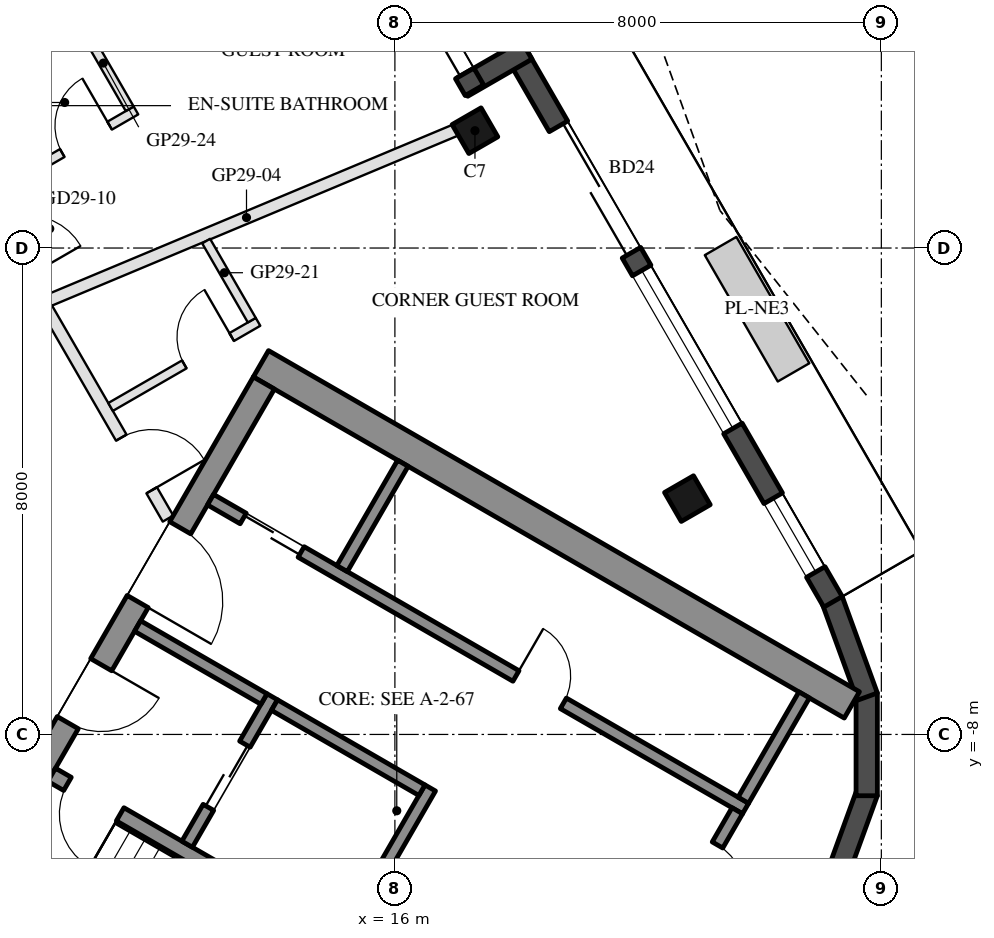
"""IFC4 building model, lengths in metres.
Left out: names, types, materials, properties, quantities, classifications, styles, units other than length and angle.
Written with IfcOpenShell. Run it as: python <this file> out.ifc"""

import sys

from ifc_helpers import new_model, si_unit, direction, frame, frame_2d, origin, origin_2d, place, context, subcontext, project, spatial, rectangle, hollow_rectangle, extrude, boolean, halfspace, element, fill, save


model = new_model("IFC4")
c1 = context("Model", 3, precision=1e-05, world=origin(), true_north=direction((0.0, 1.0)))
c2 = subcontext(c1, "Body", "Model", "MODEL_VIEW")
j1 = project(units=[si_unit("LENGTHUNIT", "METRE"), si_unit("PLANEANGLEUNIT", "RADIAN")], contexts=[c1])
p1 = place(None, origin())
s1 = spatial("IfcSite", under=j1, at=p1, CompositionType="ELEMENT")
p2 = place(p1, origin())
s2 = spatial("IfcBuilding", under=s1, at=p2, CompositionType="ELEMENT")
p3 = place(p2, frame((0.0, 0.0, 291.1)))
s3 = spatial("IfcBuildingStorey", under=s2, at=p3, CompositionType="ELEMENT", Elevation=291.1)
p4 = place(p3, frame((20.81, -4.121, 0.0), z_axis=(0.0, 0.0, 1.0), x_axis=(-0.5, 0.866025403784, 0.0)))
e1 = element("IfcColumn", 1, at=p4, inside=s3, PredefinedType="COLUMN", context=c2, shape_type="SweptSolid", body=[
    boolean("DIFFERENCE", extrude(hollow_rectangle(XDim=0.55, YDim=0.55, WallThickness=0.025, at=origin_2d()), origin(), (0.0, 0.0, 1.0), 3.7), halfspace(frame((0.0, 0.0, 0.04), z_axis=(0.0, 0.0, 1.0), x_axis=(1.0, 0.0, 0.0)), True)),
])
p5 = place(p3, frame((17.317, 1.93, 0.0), z_axis=(0.0, 0.0, 1.0), x_axis=(-0.5, 0.866025403784, 0.0)))
e2 = element("IfcColumn", 2, at=p5, inside=s3, PredefinedType="COLUMN", context=c2, shape_type="SweptSolid", body=[
    boolean("DIFFERENCE", extrude(hollow_rectangle(XDim=0.55, YDim=0.55, WallThickness=0.025, at=origin_2d()), origin(), (0.0, 0.0, 1.0), 3.7), halfspace(frame((0.0, 0.0, 0.034), z_axis=(0.0, 0.0, 1.0), x_axis=(1.0, 0.0, 0.0)), True)),
])
for number, where, z_axis, x_axis in (
    (3, (23.192, -10.536, 0.0), (0.0, 0.0, 1.0), (0.342, 0.94, 0.0)),
    (4, (23.759, -9.008, 0.0), (0.0, 0.0, 1.0), (0.0, 1.0, 0.0)),
    (5, (23.77, -7.379, 0.0), (0.0, 0.0, 1.0), (-0.342, 0.94, 0.0)),
):
    element("IfcWall", number, at=place(p3, frame(where, z_axis=z_axis, x_axis=x_axis)), inside=s3, PredefinedType="SOLIDWALL", context=c2, shape_type="SweptSolid", body=[
        extrude(rectangle(XDim=1.689, YDim=0.35, at=frame_2d((0.845, 0.0))), origin(), (0.0, 0.0, 1.0), 3.55),
    ])
p6 = place(p3, frame((23.205, -5.819, 0.0), z_axis=(0.0, 0.0, 1.0), x_axis=(-0.500010118922, 0.866019561543, 0.0)))
e6 = element("IfcWall", 6, at=p6, inside=s3, PredefinedType="SOLIDWALL", context=c2, shape_type="SweptSolid", body=[
    extrude(rectangle(XDim=10.554, YDim=0.35, at=frame_2d((5.277, 0.0))), origin(), (0.0, 0.0, 1.0), 3.55),
])
p7 = place(p6, frame((0.566, 0.0, 0.3)))
e7 = element("IfcOpeningElement", 7, at=p7, cuts=e6, PredefinedType="OPENING", context=c2, shape_type="SweptSolid", body=[
    extrude(rectangle(XDim=1.4, YDim=2.65, at=frame_2d((0.7, 1.325))), frame((0.0, 0.185, 0.0), z_axis=(0.0, -1.0, 0.0), x_axis=(1.0, 0.0, 0.0)), (0.0, 0.0, 1.0), 0.37),
])
p8 = place(p6, frame((6.63, 0.0, 0.0)))
e8 = element("IfcOpeningElement", 8, at=p8, cuts=e6, PredefinedType="OPENING", context=c2, shape_type="SweptSolid", body=[
    extrude(rectangle(XDim=2.4, YDim=2.4, at=frame_2d((1.2, 1.2))), frame((0.0, 0.185, 0.0), z_axis=(0.0, -1.0, 0.0), x_axis=(1.0, 0.0, 0.0)), (0.0, 0.0, 1.0), 0.37),
])
p9 = place(p6, frame((3.292, 0.0, 0.3)))
e9 = element("IfcOpeningElement", 9, at=p9, cuts=e6, PredefinedType="OPENING", context=c2, shape_type="SweptSolid", body=[
    extrude(rectangle(XDim=3.0, YDim=2.65, at=frame_2d((1.5, 1.325))), frame((0.0, 0.185, 0.0), z_axis=(0.0, -1.0, 0.0), x_axis=(1.0, 0.0, 0.0)), (0.0, 0.0, 1.0), 0.37),
])
p10 = place(p3, frame((18.167, 3.258, 0.0), z_axis=(0.0, 0.0, 1.0), x_axis=(-0.866005645448, -0.500034220881, 0.0)))
e10 = element("IfcWall", 10, at=p10, inside=s3, PredefinedType="SOLIDWALL", context=c2, shape_type="SweptSolid", body=[
    extrude(rectangle(XDim=1.22, YDim=0.35, at=frame_2d((0.61, 0.0))), origin(), (0.0, 0.0, 1.0), 3.55),
])
p11 = place(p3, frame((17.308, 2.595, 0.0), z_axis=(0.0, 0.0, 1.0), x_axis=(-0.500005339912, 0.866022320763, 0.0)))
e11 = element("IfcWall", 11, at=p11, inside=s3, PredefinedType="SOLIDWALL", context=c2, shape_type="SweptSolid", body=[
    extrude(rectangle(XDim=5.827, YDim=0.35, at=frame_2d((2.914, 0.0))), origin(), (0.0, 0.0, 1.0), 3.55),
])
p12 = place(p11, frame((0.32, 0.0, 0.0)))
e12 = element("IfcOpeningElement", 12, at=p12, cuts=e11, PredefinedType="OPENING", context=c2, shape_type="SweptSolid", body=[
    extrude(rectangle(XDim=1.8, YDim=2.4, at=frame_2d((0.9, 1.2))), frame((0.0, 0.185, 0.0), z_axis=(0.0, -1.0, 0.0), x_axis=(1.0, 0.0, 0.0)), (0.0, 0.0, 1.0), 0.37),
])
p13 = place(p11, frame((2.42, 0.0, 0.3)))
e13 = element("IfcOpeningElement", 13, at=p13, cuts=e11, PredefinedType="OPENING", context=c2, shape_type="SweptSolid", body=[
    extrude(rectangle(XDim=1.5, YDim=2.65, at=frame_2d((0.75, 1.325))), frame((0.0, 0.185, 0.0), z_axis=(0.0, -1.0, 0.0), x_axis=(1.0, 0.0, 0.0)), (0.0, 0.0, 1.0), 0.37),
])
p14 = place(p3, frame((13.797, -1.903, 0.0), z_axis=(0.0, 0.0, 1.0), x_axis=(0.866025449148, -0.499999921427, 0.0)))
e14 = element("IfcWall", 14, at=p14, inside=s3, PredefinedType="SHEAR", context=c2, shape_type="SweptSolid", body=[
    extrude(rectangle(XDim=11.222, YDim=0.5, at=frame_2d((5.611, 0.0))), origin(), (0.0, 0.0, 1.0), 3.5),
])
p15 = place(p3, frame((8.845, -10.88, 0.0), z_axis=(0.0, 0.0, 1.0), x_axis=(0.500004234368, 0.866022959057, 0.0)))
e15 = element("IfcWall", 15, at=p15, inside=s3, PredefinedType="SHEAR", context=c2, shape_type="SweptSolid", body=[
    extrude(rectangle(XDim=10.0, YDim=0.4, at=frame_2d((5.0, 0.0))), origin(), (0.0, 0.0, 1.0), 3.5),
])
p16 = place(p15, frame((3.55, 0.0, 0.0)))
e16 = element("IfcOpeningElement", 16, at=p16, cuts=e15, PredefinedType="OPENING", context=c2, shape_type="SweptSolid", body=[
    extrude(rectangle(XDim=1.1, YDim=2.1, at=frame_2d((0.55, 1.05))), frame((0.0, 0.21, 0.0), z_axis=(0.0, -1.0, 0.0), x_axis=(1.0, 0.0, 0.0)), (0.0, 0.0, 1.0), 0.42),
])
p17 = place(p15, frame((5.85, 0.0, 0.0)))
e17 = element("IfcOpeningElement", 17, at=p17, cuts=e15, PredefinedType="OPENING", context=c2, shape_type="SweptSolid", body=[
    extrude(rectangle(XDim=1.4, YDim=2.1, at=frame_2d((0.7, 1.05))), frame((0.0, 0.21, 0.0), z_axis=(0.0, -1.0, 0.0), x_axis=(1.0, 0.0, 0.0)), (0.0, 0.0, 1.0), 0.42),
])
p18 = place(p3, frame((10.356, -8.664, 0.0), z_axis=(0.0, 0.0, 1.0), x_axis=(0.866028629588, -0.499994412703, 0.0)))
e18 = element("IfcWall", 18, at=p18, inside=s3, PredefinedType="SHEAR", context=c2, shape_type="SweptSolid", body=[
    extrude(rectangle(XDim=6.45, YDim=0.25, at=frame_2d((3.225, 0.0))), origin(), (0.0, 0.0, 1.0), 3.5),
])
p19 = place(p18, frame((0.3, 0.0, 0.0)))
e19 = element("IfcOpeningElement", 19, at=p19, cuts=e18, PredefinedType="OPENING", context=c2, shape_type="SweptSolid", body=[
    extrude(rectangle(XDim=1.0, YDim=2.1, at=frame_2d((0.5, 1.05))), frame((0.0, 0.135, 0.0), z_axis=(0.0, -1.0, 0.0), x_axis=(1.0, 0.0, 0.0)), (0.0, 0.0, 1.0), 0.27),
])
p20 = place(p3, frame((15.181, -11.305, 0.0), z_axis=(0.0, 0.0, 1.0), x_axis=(0.49994636267, 0.866056369097, 0.0)))
e20 = element("IfcWall", 20, at=p20, inside=s3, PredefinedType="SHEAR", context=c2, shape_type="SweptSolid", body=[
    extrude(rectangle(XDim=2.8, YDim=0.2, at=frame_2d((1.4, 0.0))), origin(), (0.0, 0.0, 1.0), 3.5),
])
p21 = place(p3, frame((12.583, -9.805, 0.0), z_axis=(0.0, 0.0, 1.0), x_axis=(0.49994636267, 0.866056369097, 0.0)))
e21 = element("IfcWall", 21, at=p21, inside=s3, PredefinedType="SHEAR", context=c2, shape_type="SweptSolid", body=[
    extrude(rectangle(XDim=2.8, YDim=0.2, at=frame_2d((1.4, 0.0))), origin(), (0.0, 0.0, 1.0), 3.5),
])
p22 = place(p21, frame((0.7, 0.0, 0.0)))
e22 = element("IfcOpeningElement", 22, at=p22, cuts=e21, PredefinedType="OPENING", context=c2, shape_type="SweptSolid", body=[
    extrude(rectangle(XDim=1.2, YDim=2.1, at=frame_2d((0.6, 1.05))), frame((0.0, 0.11, 0.0), z_axis=(0.0, -1.0, 0.0), x_axis=(1.0, 0.0, 0.0)), (0.0, 0.0, 1.0), 0.22),
])
p23 = place(p3, frame((11.768, -6.217, 0.0), z_axis=(0.0, 0.0, 1.0), x_axis=(0.866050077142, -0.499957262057, 0.0)))
e23 = element("IfcWall", 23, at=p23, inside=s3, PredefinedType="SHEAR", context=c2, shape_type="SweptSolid", body=[
    extrude(rectangle(XDim=2.4, YDim=0.2, at=frame_2d((1.2, 0.0))), origin(), (0.0, 0.0, 1.0), 3.5),
])
p24 = place(p3, frame((14.02, -7.517, 0.0), z_axis=(0.0, 0.0, 1.0), x_axis=(0.866034573852, -0.49998411664, 0.0)))
e24 = element("IfcWall", 24, at=p24, inside=s3, PredefinedType="SHEAR", context=c2, shape_type="SweptSolid", body=[
    extrude(rectangle(XDim=2.8, YDim=0.2, at=frame_2d((1.4, 0.0))), origin(), (0.0, 0.0, 1.0), 3.5),
])
p25 = place(p3, frame((12.968, -4.138, 0.0), z_axis=(0.0, 0.0, 1.0), x_axis=(0.866028328073, -0.49999493495, 0.0)))
e25 = element("IfcWall", 25, at=p25, inside=s3, PredefinedType="SHEAR", context=c2, shape_type="SweptSolid", body=[
    extrude(rectangle(XDim=10.16, YDim=0.2, at=frame_2d((5.08, 0.0))), origin(), (0.0, 0.0, 1.0), 3.5),
])
p26 = place(p25, frame((0.62, 0.0, 0.0)))
e26 = element("IfcOpeningElement", 26, at=p26, cuts=e25, PredefinedType="OPENING", context=c2, shape_type="SweptSolid", body=[
    extrude(rectangle(XDim=1.1, YDim=2.1, at=frame_2d((0.55, 1.05))), frame((0.0, 0.11, 0.0), z_axis=(0.0, -1.0, 0.0), x_axis=(1.0, 0.0, 0.0)), (0.0, 0.0, 1.0), 0.22),
])
p27 = place(p25, frame((5.8, 0.0, 0.0)))
e27 = element("IfcOpeningElement", 27, at=p27, cuts=e25, PredefinedType="OPENING", context=c2, shape_type="SweptSolid", body=[
    extrude(rectangle(XDim=0.9, YDim=2.1, at=frame_2d((0.45, 1.05))), frame((0.0, 0.11, 0.0), z_axis=(0.0, -1.0, 0.0), x_axis=(1.0, 0.0, 0.0)), (0.0, 0.0, 1.0), 0.22),
])
p28 = place(p3, frame((20.73, -10.814, 0.0), z_axis=(0.0, 0.0, 1.0), x_axis=(0.499961193289, 0.866047807691, 0.0)))
e28 = element("IfcWall", 28, at=p28, inside=s3, PredefinedType="SHEAR", context=c2, shape_type="SweptSolid", body=[
    extrude(rectangle(XDim=1.8, YDim=0.2, at=frame_2d((0.9, 0.0))), origin(), (0.0, 0.0, 1.0), 3.5),
])
p29 = place(p28, frame((0.25, 0.0, 0.0)))
e29 = element("IfcOpeningElement", 29, at=p29, cuts=e28, PredefinedType="OPENING", context=c2, shape_type="SweptSolid", body=[
    extrude(rectangle(XDim=0.9, YDim=2.1, at=frame_2d((0.45, 1.05))), frame((0.0, 0.11, 0.0), z_axis=(0.0, -1.0, 0.0), x_axis=(1.0, 0.0, 0.0)), (0.0, 0.0, 1.0), 0.22),
])
for number, where, z_axis, x_axis in (
    (30, (15.131, -5.272, 0.0), (0.0, 0.0, 1.0), (0.5, 0.866, 0.0)),
    (31, (21.73, -9.082, 0.0), (0.0, 0.0, 1.0), (0.5, 0.866, 0.0)),
):
    element("IfcWall", number, at=place(p3, frame(where, z_axis=z_axis, x_axis=x_axis)), inside=s3, PredefinedType="SHEAR", context=c2, shape_type="SweptSolid", body=[
        extrude(rectangle(XDim=2.0, YDim=0.2, at=frame_2d((1.0, 0.0))), origin(), (0.0, 0.0, 1.0), 3.5),
    ])
p30 = place(p3, frame((16.994, 1.939, 0.0), z_axis=(0.0, 0.0, 1.0), x_axis=(-0.922394541425, -0.386249025824, 0.0)))
e32 = element("IfcWall", 32, at=p30, inside=s3, PredefinedType="PARTITIONING", context=c2, shape_type="SweptSolid", body=[
    extrude(rectangle(XDim=7.447, YDim=0.2, at=frame_2d((3.723, 0.0))), origin(), (0.0, 0.0, 1.0), 3.05),
])
p31 = place(p3, frame((14.953, 6.324, 0.0), z_axis=(0.0, 0.0, 1.0), x_axis=(-0.866030491634, -0.499991187483, 0.0)))
e33 = element("IfcWall", 33, at=p31, inside=s3, PredefinedType="PARTITIONING", context=c2, shape_type="SweptSolid", body=[
    extrude(rectangle(XDim=7.812, YDim=0.2, at=frame_2d((3.906, 0.0))), origin(), (0.0, 0.0, 1.0), 3.16),
])
p32 = place(p3, frame((10.269, -0.986, 0.0), z_axis=(0.0, 0.0, 1.0), x_axis=(0.50004472278, -0.865999581536, 0.0)))
e34 = element("IfcWall", 34, at=p32, inside=s3, PredefinedType="PARTITIONING", context=c2, shape_type="SweptSolid", body=[
    extrude(rectangle(XDim=4.0, YDim=0.2, at=frame_2d((2.0, 0.0))), origin(), (0.0, 0.0, 1.0), 3.05),
])
p33 = place(p32, frame((2.463, 0.0, 0.0)))
e35 = element("IfcOpeningElement", 35, at=p33, cuts=e34, PredefinedType="OPENING", context=c2, shape_type="SweptSolid", body=[
    extrude(rectangle(XDim=1.0, YDim=2.1, at=frame_2d((0.5, 1.05))), frame((0.0, 0.11, 0.0), z_axis=(0.0, -1.0, 0.0), x_axis=(1.0, 0.0, 0.0)), (0.0, 0.0, 1.0), 0.22),
])
p34 = place(p3, frame((11.324, -2.614, 0.0), z_axis=(0.0, 0.0, 1.0), x_axis=(0.866034573852, 0.49998411664, 0.0)))
e36 = element("IfcWall", 36, at=p34, inside=s3, PredefinedType="PARTITIONING", context=c2, shape_type="SweptSolid", body=[
    extrude(rectangle(XDim=2.8, YDim=0.15, at=frame_2d((1.4, 0.0))), origin(), (0.0, 0.0, 1.0), 3.55),
])
p35 = place(p34, frame((1.4, 0.0, 0.0)))
e37 = element("IfcOpeningElement", 37, at=p35, cuts=e36, PredefinedType="OPENING", context=c2, shape_type="SweptSolid", body=[
    extrude(rectangle(XDim=0.9, YDim=2.1, at=frame_2d((0.45, 1.05))), frame((0.0, 0.085, 0.0), z_axis=(0.0, -1.0, 0.0), x_axis=(1.0, 0.0, 0.0)), (0.0, 0.0, 1.0), 0.17),
])
p36 = place(p3, frame((13.646, -1.187, 0.0), z_axis=(0.0, 0.0, 1.0), x_axis=(-0.499985098601, 0.86603400694, 0.0)))
e38 = element("IfcWall", 38, at=p36, inside=s3, PredefinedType="PARTITIONING", context=c2, shape_type="SweptSolid", body=[
    extrude(rectangle(XDim=1.502, YDim=0.15, at=frame_2d((0.751, 0.0))), origin(), (0.0, 0.0, 1.0), 3.05),
])
p37 = place(p3, frame((9.317, 0.863, 0.0), z_axis=(0.0, 0.0, 1.0), x_axis=(0.865996816683, 0.500049511043, 0.0)))
e39 = element("IfcWall", 39, at=p37, inside=s3, PredefinedType="PARTITIONING", context=c2, shape_type="SweptSolid", body=[
    extrude(rectangle(XDim=2.8, YDim=0.15, at=frame_2d((1.4, 0.0))), origin(), (0.0, 0.0, 1.0), 3.55),
])
p38 = place(p37, frame((1.4, 0.0, 0.0)))
e40 = element("IfcOpeningElement", 40, at=p38, cuts=e39, PredefinedType="OPENING", context=c2, shape_type="SweptSolid", body=[
    extrude(rectangle(XDim=0.9, YDim=2.1, at=frame_2d((0.45, 1.05))), frame((0.0, 0.085, 0.0), z_axis=(0.0, -1.0, 0.0), x_axis=(1.0, 0.0, 0.0)), (0.0, 0.0, 1.0), 0.17),
])
p39 = place(p3, frame((11.639, 2.29, 0.0), z_axis=(0.0, 0.0, 1.0), x_axis=(-0.500115958453, 0.865958444789, 0.0)))
e41 = element("IfcWall", 41, at=p39, inside=s3, PredefinedType="PARTITIONING", context=c2, shape_type="SweptSolid", body=[
    extrude(rectangle(XDim=1.736, YDim=0.15, at=frame_2d((0.868, 0.0))), origin(), (0.0, 0.0, 1.0), 3.05),
])
p40 = place(p7, origin())
e42 = element("IfcWindow", 42, at=p40, inside=s3, PartitioningType="SINGLE_PANEL", PredefinedType="WINDOW", context=c2, shape_type="SweptSolid", body=[
    extrude(rectangle(XDim=1.4, YDim=2.65, at=frame_2d((0.7, 1.325))), frame((0.0, 0.03, 0.0), z_axis=(0.0, -1.0, 0.0), x_axis=(1.0, 0.0, 0.0)), (0.0, 0.0, 1.0), 0.06),
])
fill(e7, e42)
p41 = place(p8, frame((2.4, 0.0, 0.0), z_axis=(0.0, 0.0, 1.0), x_axis=(-1.0, 0.0, 0.0)))
e43 = element("IfcDoor", 43, at=p41, inside=s3, OperationType="SLIDING_TO_LEFT", PredefinedType="DOOR", context=c2, shape_type="SweptSolid", body=[
    extrude(rectangle(XDim=2.4, YDim=2.4, at=frame_2d((1.2, 1.2))), frame((0.0, 0.025, 0.0), z_axis=(0.0, -1.0, 0.0), x_axis=(1.0, 0.0, 0.0)), (0.0, 0.0, 1.0), 0.05),
])
fill(e8, e43)
p42 = place(p9, origin())
e44 = element("IfcWindow", 44, at=p42, inside=s3, PartitioningType="SINGLE_PANEL", PredefinedType="WINDOW", context=c2, shape_type="SweptSolid", body=[
    extrude(rectangle(XDim=3.0, YDim=2.65, at=frame_2d((1.5, 1.325))), frame((0.0, 0.03, 0.0), z_axis=(0.0, -1.0, 0.0), x_axis=(1.0, 0.0, 0.0)), (0.0, 0.0, 1.0), 0.06),
])
fill(e9, e44)
p43 = place(p12, frame((1.8, 0.0, 0.0), z_axis=(0.0, 0.0, 1.0), x_axis=(-1.0, 0.0, 0.0)))
e45 = element("IfcDoor", 45, at=p43, inside=s3, OperationType="SLIDING_TO_LEFT", PredefinedType="DOOR", context=c2, shape_type="SweptSolid", body=[
    extrude(rectangle(XDim=1.8, YDim=2.4, at=frame_2d((0.9, 1.2))), frame((0.0, 0.025, 0.0), z_axis=(0.0, -1.0, 0.0), x_axis=(1.0, 0.0, 0.0)), (0.0, 0.0, 1.0), 0.05),
])
fill(e12, e45)
p44 = place(p22, origin())
e46 = element("IfcDoor", 46, at=p44, inside=s3, OperationType="DOUBLE_DOOR_SLIDING", PredefinedType="DOOR", context=c2, shape_type="SweptSolid", body=[
    extrude(rectangle(XDim=1.2, YDim=2.1, at=frame_2d((0.6, 1.05))), frame((0.0, 0.025, 0.0), z_axis=(0.0, -1.0, 0.0), x_axis=(1.0, 0.0, 0.0)), (0.0, 0.0, 1.0), 0.05),
])
fill(e22, e46)
p45 = place(p26, origin())
e47 = element("IfcDoor", 47, at=p45, inside=s3, OperationType="DOUBLE_DOOR_SLIDING", PredefinedType="DOOR", context=c2, shape_type="SweptSolid", body=[
    extrude(rectangle(XDim=1.1, YDim=2.1, at=frame_2d((0.55, 1.05))), frame((0.0, 0.025, 0.0), z_axis=(0.0, -1.0, 0.0), x_axis=(1.0, 0.0, 0.0)), (0.0, 0.0, 1.0), 0.05),
])
fill(e26, e47)
p46 = place(p27, origin())
e48 = element("IfcDoor", 48, at=p46, inside=s3, OperationType="SINGLE_SWING_LEFT", PredefinedType="DOOR", context=c2, shape_type="SweptSolid", body=[
    extrude(rectangle(XDim=0.9, YDim=2.1, at=frame_2d((0.45, 1.05))), frame((0.0, 0.025, 0.0), z_axis=(0.0, -1.0, 0.0), x_axis=(1.0, 0.0, 0.0)), (0.0, 0.0, 1.0), 0.05),
])
fill(e27, e48)
p47 = place(p29, frame((0.9, 0.0, 0.0), z_axis=(0.0, 0.0, 1.0), x_axis=(-1.0, 0.0, 0.0)))
e49 = element("IfcDoor", 49, at=p47, inside=s3, OperationType="SINGLE_SWING_RIGHT", PredefinedType="DOOR", context=c2, shape_type="SweptSolid", body=[
    extrude(rectangle(XDim=0.9, YDim=2.1, at=frame_2d((0.45, 1.05))), frame((0.0, 0.025, 0.0), z_axis=(0.0, -1.0, 0.0), x_axis=(1.0, 0.0, 0.0)), (0.0, 0.0, 1.0), 0.05),
])
fill(e29, e49)
p48 = place(p16, frame((1.1, 0.0, 0.0), z_axis=(0.0, 0.0, 1.0), x_axis=(-1.0, 0.0, 0.0)))
e50 = element("IfcDoor", 50, at=p48, inside=s3, OperationType="SINGLE_SWING_LEFT", PredefinedType="DOOR", context=c2, shape_type="SweptSolid", body=[
    extrude(rectangle(XDim=1.1, YDim=2.1, at=frame_2d((0.55, 1.05))), frame((0.0, 0.025, 0.0), z_axis=(0.0, -1.0, 0.0), x_axis=(1.0, 0.0, 0.0)), (0.0, 0.0, 1.0), 0.05),
])
fill(e16, e50)
p49 = place(p17, frame((1.4, 0.0, 0.0), z_axis=(0.0, 0.0, 1.0), x_axis=(-1.0, 0.0, 0.0)))
e51 = element("IfcDoor", 51, at=p49, inside=s3, OperationType="DOUBLE_DOOR_SINGLE_SWING", PredefinedType="DOOR", context=c2, shape_type="SweptSolid", body=[
    extrude(rectangle(XDim=1.4, YDim=2.1, at=frame_2d((0.7, 1.05))), frame((0.0, 0.025, 0.0), z_axis=(0.0, -1.0, 0.0), x_axis=(1.0, 0.0, 0.0)), (0.0, 0.0, 1.0), 0.05),
])
fill(e17, e51)
p50 = place(p19, frame((1.0, 0.0, 0.0), z_axis=(0.0, 0.0, 1.0), x_axis=(-1.0, 0.0, 0.0)))
e52 = element("IfcDoor", 52, at=p50, inside=s3, OperationType="SINGLE_SWING_LEFT", PredefinedType="DOOR", context=c2, shape_type="SweptSolid", body=[
    extrude(rectangle(XDim=1.0, YDim=2.1, at=frame_2d((0.5, 1.05))), frame((0.0, 0.025, 0.0), z_axis=(0.0, -1.0, 0.0), x_axis=(1.0, 0.0, 0.0)), (0.0, 0.0, 1.0), 0.05),
])
fill(e19, e52)
p51 = place(p35, origin())
e53 = element("IfcDoor", 53, at=p51, inside=s3, OperationType="SINGLE_SWING_RIGHT", PredefinedType="DOOR", context=c2, shape_type="SweptSolid", body=[
    extrude(rectangle(XDim=0.9, YDim=2.1, at=frame_2d((0.45, 1.05))), frame((0.0, 0.025, 0.0), z_axis=(0.0, -1.0, 0.0), x_axis=(1.0, 0.0, 0.0)), (0.0, 0.0, 1.0), 0.05),
])
fill(e37, e53)
p52 = place(p33, origin())
e54 = element("IfcDoor", 54, at=p52, inside=s3, OperationType="SINGLE_SWING_RIGHT", PredefinedType="DOOR", context=c2, shape_type="SweptSolid", body=[
    extrude(rectangle(XDim=1.0, YDim=2.1, at=frame_2d((0.5, 1.05))), frame((0.0, 0.025, 0.0), z_axis=(0.0, -1.0, 0.0), x_axis=(1.0, 0.0, 0.0)), (0.0, 0.0, 1.0), 0.05),
])
fill(e35, e54)
p53 = place(p38, origin())
e55 = element("IfcDoor", 55, at=p53, inside=s3, OperationType="SINGLE_SWING_RIGHT", PredefinedType="DOOR", context=c2, shape_type="SweptSolid", body=[
    extrude(rectangle(XDim=0.9, YDim=2.1, at=frame_2d((0.45, 1.05))), frame((0.0, 0.025, 0.0), z_axis=(0.0, -1.0, 0.0), x_axis=(1.0, 0.0, 0.0)), (0.0, 0.0, 1.0), 0.05),
])
fill(e40, e55)
save(model, sys.argv[1])
